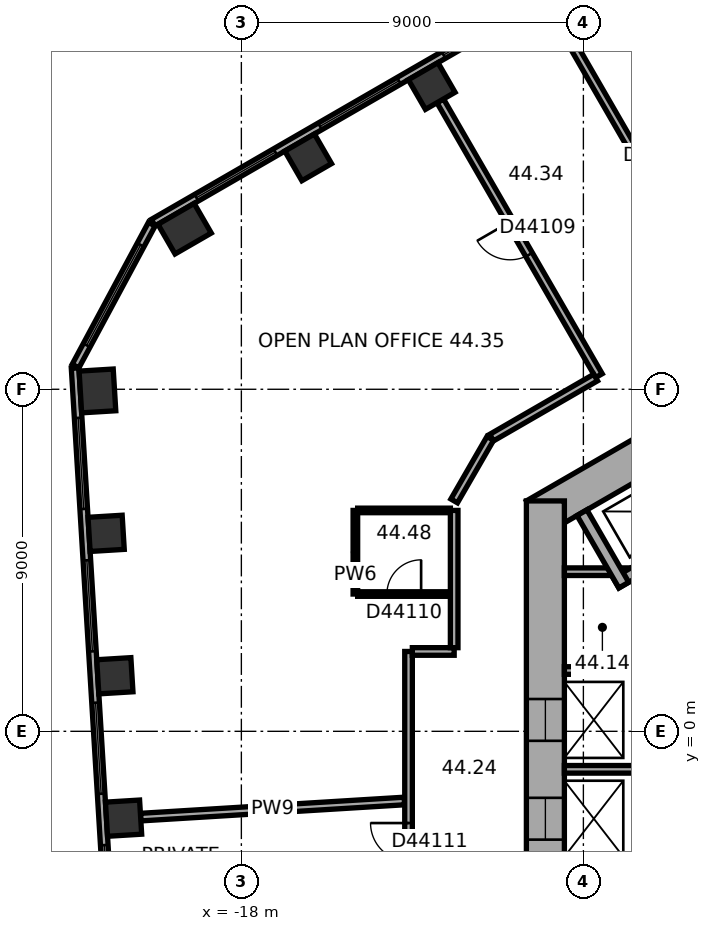
"""IFC4 building model, lengths in metres.
Left out: names, types, materials, properties, quantities, classifications, styles, units other than length and angle.
Written with IfcOpenShell. Run it as: python <this file> out.ifc"""

import sys

from ifc_helpers import new_model, si_unit, direction, frame, frame_2d, origin, origin_2d, place, context, subcontext, project, spatial, rectangle, extrude, element, fill, save


model = new_model("IFC4")
c1 = context("Model", 3, precision=1e-05, world=origin(), true_north=direction((0.0, 1.0)))
c2 = subcontext(c1, "Body", "Model", "MODEL_VIEW")
j1 = project(units=[si_unit("LENGTHUNIT", "METRE"), si_unit("PLANEANGLEUNIT", "RADIAN")], contexts=[c1])
p1 = place(None, origin())
s1 = spatial("IfcSite", under=j1, at=p1, CompositionType="ELEMENT")
p2 = place(p1, origin())
s2 = spatial("IfcBuilding", under=s1, at=p2, CompositionType="ELEMENT")
p3 = place(p2, frame((0.0, 0.0, 179.9)))
s3 = spatial("IfcBuildingStorey", under=s2, at=p3, CompositionType="ELEMENT", Elevation=179.9)
for number, where, z_axis, x_axis in (
    (1, (-12.991, 16.979, 0.0), (0.0, 0.0, 1.0), (-0.866, -0.5, 0.0)),
    (2, (-16.242, 15.102, 0.0), (0.0, 0.0, 1.0), (-0.866, -0.5, 0.0)),
):
    element("IfcColumn", number, at=place(p3, frame(where, z_axis=z_axis, x_axis=x_axis)), inside=s3, PredefinedType="COLUMN", context=c2, shape_type="SweptSolid", body=[
        extrude(rectangle(XDim=0.9, YDim=0.9, at=origin_2d()), origin(), (0.0, 0.0, 1.0), 3.7),
    ])
for number, where, z_axis, x_axis in (
    (3, (-19.494, 13.225, 0.0), (0.0, 0.0, 1.0), (-0.866, -0.5, 0.0)),
    (4, (-21.787, 8.956, 0.0), (0.0, 0.0, 1.0), (0.061, -0.998, 0.0)),
):
    element("IfcColumn", number, at=place(p3, frame(where, z_axis=z_axis, x_axis=x_axis)), inside=s3, PredefinedType="COLUMN", context=c2, shape_type="SweptSolid", body=[
        extrude(rectangle(XDim=1.1, YDim=0.9, at=origin_2d()), origin(), (0.0, 0.0, 1.0), 3.7),
    ])
for number, where, z_axis, x_axis in (
    (5, (-21.558, 5.209, 0.0), (0.0, 0.0, 1.0), (0.061, -0.998, 0.0)),
    (6, (-21.329, 1.462, 0.0), (0.0, 0.0, 1.0), (0.061, -0.998, 0.0)),
    (7, (-21.1, -2.285, 0.0), (0.0, 0.0, 1.0), (0.061, -0.998, 0.0)),
):
    element("IfcColumn", number, at=place(p3, frame(where, z_axis=z_axis, x_axis=x_axis)), inside=s3, PredefinedType="COLUMN", context=c2, shape_type="SweptSolid", body=[
        extrude(rectangle(XDim=0.9, YDim=0.9, at=origin_2d()), origin(), (0.0, 0.0, 1.0), 3.7),
    ])
p4 = place(p3, frame((0.25, 11.691, 0.0), z_axis=(0.0, 0.0, 1.0), x_axis=(-0.866022616891, -0.50000482701, 0.0)))
e8 = element("IfcWall", 8, at=p4, inside=s3, PredefinedType="SHEAR", context=c2, shape_type="SweptSolid", body=[
    extrude(rectangle(XDim=12.125, YDim=1.0, at=frame_2d((6.062, 0.0))), origin(), (0.0, 0.0, 1.0), 3.7),
])
p5 = place(p4, frame((6.262, 0.0, 0.0)))
e9 = element("IfcOpeningElement", 9, at=p5, cuts=e8, PredefinedType="OPENING", context=c2, shape_type="SweptSolid", body=[
    extrude(rectangle(XDim=1.5, YDim=2.1, at=frame_2d((0.75, 1.05))), frame((0.0, 0.51, 0.0), z_axis=(0.0, -1.0, 0.0), x_axis=(1.0, 0.0, 0.0)), (0.0, 0.0, 1.0), 1.02),
])
p6 = place(p4, frame((1.812, 0.0, 0.0)))
e10 = element("IfcOpeningElement", 10, at=p6, cuts=e8, PredefinedType="OPENING", context=c2, shape_type="SweptSolid", body=[
    extrude(rectangle(XDim=0.9, YDim=2.1, at=frame_2d((0.45, 1.05))), frame((0.0, 0.51, 0.0), z_axis=(0.0, -1.0, 0.0), x_axis=(1.0, 0.0, 0.0)), (0.0, 0.0, 1.0), 1.02),
])
p7 = place(p4, frame((4.412, 0.0, 0.0)))
e11 = element("IfcOpeningElement", 11, at=p7, cuts=e8, PredefinedType="OPENING", context=c2, shape_type="SweptSolid", body=[
    extrude(rectangle(XDim=0.9, YDim=2.1, at=frame_2d((0.45, 1.05))), frame((0.0, 0.51, 0.0), z_axis=(0.0, -1.0, 0.0), x_axis=(1.0, 0.0, 0.0)), (0.0, 0.0, 1.0), 1.02),
])
p8 = place(p3, frame((-10.0, 6.062, 0.0), z_axis=(0.0, 0.0, 1.0), x_axis=(0.0, -1.0, 0.0)))
e12 = element("IfcWall", 12, at=p8, inside=s3, PredefinedType="SHEAR", context=c2, shape_type="SweptSolid", body=[
    extrude(rectangle(XDim=12.125, YDim=1.0, at=frame_2d((6.062, 0.0))), origin(), (0.0, 0.0, 1.0), 3.7),
])
p9 = place(p8, frame((5.212, 0.0, 0.0)))
e13 = element("IfcOpeningElement", 13, at=p9, cuts=e12, PredefinedType="OPENING", context=c2, shape_type="SweptSolid", body=[
    extrude(rectangle(XDim=1.1, YDim=2.1, at=frame_2d((0.55, 1.05))), frame((0.0, 0.51, 0.0), z_axis=(0.0, -1.0, 0.0), x_axis=(1.0, 0.0, 0.0)), (0.0, 0.0, 1.0), 1.02),
])
p10 = place(p8, frame((7.812, 0.0, 0.0)))
e14 = element("IfcOpeningElement", 14, at=p10, cuts=e12, PredefinedType="OPENING", context=c2, shape_type="SweptSolid", body=[
    extrude(rectangle(XDim=1.1, YDim=2.1, at=frame_2d((0.55, 1.05))), frame((0.0, 0.51, 0.0), z_axis=(0.0, -1.0, 0.0), x_axis=(1.0, 0.0, 0.0)), (0.0, 0.0, 1.0), 1.02),
])
p11 = place(p3, frame((-2.961, 23.405, 0.0), z_axis=(0.0, 0.0, 1.0), x_axis=(-0.866023315909, -0.500003616288, 0.0)))
e15 = element("IfcWall", 15, at=p11, inside=s3, PredefinedType="STANDARD", context=c2, shape_type="SweptSolid", body=[
    extrude(rectangle(XDim=20.044, YDim=0.2, at=frame_2d((10.022, 0.0))), origin(), (0.0, 0.0, 1.0), 3.7),
])
p12 = place(p11, frame((1.314, 0.0, 0.9)))
e16 = element("IfcOpeningElement", 16, at=p12, cuts=e15, PredefinedType="OPENING", context=c2, shape_type="SweptSolid", body=[
    extrude(rectangle(XDim=2.4, YDim=2.0, at=frame_2d((1.2, 1.0))), frame((0.0, 0.11, 0.0), z_axis=(0.0, -1.0, 0.0), x_axis=(1.0, 0.0, 0.0)), (0.0, 0.0, 1.0), 0.22),
])
p13 = place(p11, frame((5.069, 0.0, 0.9)))
e17 = element("IfcOpeningElement", 17, at=p13, cuts=e15, PredefinedType="OPENING", context=c2, shape_type="SweptSolid", body=[
    extrude(rectangle(XDim=2.4, YDim=2.0, at=frame_2d((1.2, 1.0))), frame((0.0, 0.11, 0.0), z_axis=(0.0, -1.0, 0.0), x_axis=(1.0, 0.0, 0.0)), (0.0, 0.0, 1.0), 0.22),
])
p14 = place(p11, frame((8.823, 0.0, 0.9)))
e18 = element("IfcOpeningElement", 18, at=p14, cuts=e15, PredefinedType="OPENING", context=c2, shape_type="SweptSolid", body=[
    extrude(rectangle(XDim=2.4, YDim=2.0, at=frame_2d((1.2, 1.0))), frame((0.0, 0.11, 0.0), z_axis=(0.0, -1.0, 0.0), x_axis=(1.0, 0.0, 0.0)), (0.0, 0.0, 1.0), 0.22),
])
p15 = place(p11, frame((12.577, 0.0, 0.9)))
e19 = element("IfcOpeningElement", 19, at=p15, cuts=e15, PredefinedType="OPENING", context=c2, shape_type="SweptSolid", body=[
    extrude(rectangle(XDim=2.4, YDim=2.0, at=frame_2d((1.2, 1.0))), frame((0.0, 0.11, 0.0), z_axis=(0.0, -1.0, 0.0), x_axis=(1.0, 0.0, 0.0)), (0.0, 0.0, 1.0), 0.22),
])
p16 = place(p11, frame((16.331, 0.0, 0.9)))
e20 = element("IfcOpeningElement", 20, at=p16, cuts=e15, PredefinedType="OPENING", context=c2, shape_type="SweptSolid", body=[
    extrude(rectangle(XDim=2.4, YDim=2.0, at=frame_2d((1.2, 1.0))), frame((0.0, 0.11, 0.0), z_axis=(0.0, -1.0, 0.0), x_axis=(1.0, 0.0, 0.0)), (0.0, 0.0, 1.0), 0.22),
])
p17 = place(p3, frame((-20.357, 13.344, 0.0), z_axis=(0.0, 0.0, 1.0), x_axis=(-0.473288913494, -0.880907262068, 0.0)))
e21 = element("IfcWall", 21, at=p17, inside=s3, PredefinedType="STANDARD", context=c2, shape_type="SweptSolid", body=[
    extrude(rectangle(XDim=4.238, YDim=0.2, at=frame_2d((2.119, 0.0))), origin(), (0.0, 0.0, 1.0), 3.7),
])
p18 = place(p17, frame((0.619, 0.0, 0.9)))
e22 = element("IfcOpeningElement", 22, at=p18, cuts=e21, PredefinedType="OPENING", context=c2, shape_type="SweptSolid", body=[
    extrude(rectangle(XDim=3.0, YDim=2.0, at=frame_2d((1.5, 1.0))), frame((0.0, 0.11, 0.0), z_axis=(0.0, -1.0, 0.0), x_axis=(1.0, 0.0, 0.0)), (0.0, 0.0, 1.0), 0.22),
])
p19 = place(p3, frame((-22.375, 9.557, 0.0), z_axis=(0.0, 0.0, 1.0), x_axis=(0.061036015339, -0.998135564356, 0.0)))
e23 = element("IfcWall", 23, at=p19, inside=s3, PredefinedType="STANDARD", context=c2, shape_type="SweptSolid", body=[
    extrude(rectangle(XDim=20.044, YDim=0.2, at=frame_2d((10.022, 0.0))), origin(), (0.0, 0.0, 1.0), 3.7),
])
p20 = place(p19, frame((1.313, 0.0, 0.9)))
e24 = element("IfcOpeningElement", 24, at=p20, cuts=e23, PredefinedType="OPENING", context=c2, shape_type="SweptSolid", body=[
    extrude(rectangle(XDim=2.4, YDim=2.0, at=frame_2d((1.2, 1.0))), frame((0.0, 0.11, 0.0), z_axis=(0.0, -1.0, 0.0), x_axis=(1.0, 0.0, 0.0)), (0.0, 0.0, 1.0), 0.22),
])
p21 = place(p19, frame((5.067, 0.0, 0.9)))
e25 = element("IfcOpeningElement", 25, at=p21, cuts=e23, PredefinedType="OPENING", context=c2, shape_type="SweptSolid", body=[
    extrude(rectangle(XDim=2.4, YDim=2.0, at=frame_2d((1.2, 1.0))), frame((0.0, 0.11, 0.0), z_axis=(0.0, -1.0, 0.0), x_axis=(1.0, 0.0, 0.0)), (0.0, 0.0, 1.0), 0.22),
])
p22 = place(p19, frame((8.821, 0.0, 0.9)))
e26 = element("IfcOpeningElement", 26, at=p22, cuts=e23, PredefinedType="OPENING", context=c2, shape_type="SweptSolid", body=[
    extrude(rectangle(XDim=2.4, YDim=2.0, at=frame_2d((1.2, 1.0))), frame((0.0, 0.11, 0.0), z_axis=(0.0, -1.0, 0.0), x_axis=(1.0, 0.0, 0.0)), (0.0, 0.0, 1.0), 0.22),
])
p23 = place(p19, frame((12.575, 0.0, 0.9)))
e27 = element("IfcOpeningElement", 27, at=p23, cuts=e23, PredefinedType="OPENING", context=c2, shape_type="SweptSolid", body=[
    extrude(rectangle(XDim=2.4, YDim=2.0, at=frame_2d((1.2, 1.0))), frame((0.0, 0.11, 0.0), z_axis=(0.0, -1.0, 0.0), x_axis=(1.0, 0.0, 0.0)), (0.0, 0.0, 1.0), 0.22),
])
p24 = place(p19, frame((16.329, 0.0, 0.9)))
e28 = element("IfcOpeningElement", 28, at=p24, cuts=e23, PredefinedType="OPENING", context=c2, shape_type="SweptSolid", body=[
    extrude(rectangle(XDim=2.4, YDim=2.0, at=frame_2d((1.2, 1.0))), frame((0.0, 0.11, 0.0), z_axis=(0.0, -1.0, 0.0), x_axis=(1.0, 0.0, 0.0)), (0.0, 0.0, 1.0), 0.22),
])
for number, where, z_axis, x_axis in (
    (29, (-7.3, 4.2, 0.0), (0.0, 0.0, 1.0), (-1.0, 0.0, 0.0)),
    (30, (-7.3, 1.6, 0.0), (0.0, 0.0, 1.0), (-1.0, 0.0, 0.0)),
    (31, (-7.3, -1.0, 0.0), (0.0, 0.0, 1.0), (-1.0, 0.0, 0.0)),
):
    element("IfcWall", number, at=place(p3, frame(where, z_axis=z_axis, x_axis=x_axis)), inside=s3, PredefinedType="PARTITIONING", context=c2, shape_type="SweptSolid", body=[
        extrude(rectangle(XDim=2.2, YDim=0.2, at=frame_2d((1.1, 0.0))), origin(), (0.0, 0.0, 1.0), 3.42),
    ])
p25 = place(p3, frame((-5.24, 5.577, 0.0), z_axis=(0.0, 0.0, 1.0), x_axis=(-0.866014461049, -0.500018952895, 0.0)))
e32 = element("IfcWall", 32, at=p25, inside=s3, PredefinedType="SHEAR", context=c2, shape_type="SweptSolid", body=[
    extrude(rectangle(XDim=3.35, YDim=0.3, at=frame_2d((1.675, 0.0))), origin(), (0.0, 0.0, 1.0), 3.42),
])
p26 = place(p3, frame((-7.937, 3.847, 0.0), z_axis=(0.0, 0.0, 1.0), x_axis=(-0.50002983664, 0.866008176907, 0.0)))
e33 = element("IfcWall", 33, at=p26, inside=s3, PredefinedType="SHEAR", context=c2, shape_type="SweptSolid", body=[
    extrude(rectangle(XDim=2.2, YDim=0.3, at=frame_2d((1.1, 0.0))), origin(), (0.0, 0.0, 1.0), 3.42),
])
p27 = place(p3, frame((-20.651, -2.258, 0.0), z_axis=(0.0, 0.0, 1.0), x_axis=(0.998133960965, 0.061062230286, 0.0)))
e34 = element("IfcWall", 34, at=p27, inside=s3, PredefinedType="PARTITIONING", context=c2, shape_type="SweptSolid", body=[
    extrude(rectangle(XDim=6.953, YDim=0.2, at=frame_2d((3.477, 0.0))), origin(), (0.0, 0.0, 1.0), 3.42),
])
p28 = place(p3, frame((-15.0, 3.612, 0.0), z_axis=(0.0, 0.0, 1.0), x_axis=(0.0, 1.0, 0.0)))
e35 = element("IfcWall", 35, at=p28, inside=s3, PredefinedType="PARTITIONING", context=c2, shape_type="SweptSolid", body=[
    extrude(rectangle(XDim=2.2, YDim=0.12, at=frame_2d((1.1, 0.0))), origin(), (0.0, 0.0, 1.0), 3.42),
])
p29 = place(p3, frame((-14.94, 5.812, 0.0), z_axis=(0.0, 0.0, 1.0), x_axis=(1.0, 0.0, 0.0)))
e36 = element("IfcWall", 36, at=p29, inside=s3, PredefinedType="PARTITIONING", context=c2, shape_type="SweptSolid", body=[
    extrude(rectangle(XDim=2.44, YDim=0.12, at=frame_2d((1.22, 0.0))), origin(), (0.0, 0.0, 1.0), 3.42),
])
p30 = place(p3, frame((-13.601, 2.101, 0.0), z_axis=(0.0, 0.0, 1.0), x_axis=(0.0, -1.0, 0.0)))
e37 = element("IfcWall", 37, at=p30, inside=s3, PredefinedType="PARTITIONING", context=c2, shape_type="SweptSolid", body=[
    extrude(rectangle(XDim=6.102, YDim=0.2, at=frame_2d((3.051, 0.0))), origin(), (0.0, 0.0, 1.0), 3.42),
])
p31 = place(p30, frame((4.515, 0.0, 0.0)))
e38 = element("IfcOpeningElement", 38, at=p31, cuts=e37, PredefinedType="OPENING", context=c2, shape_type="SweptSolid", body=[
    extrude(rectangle(XDim=1.0, YDim=2.1, at=frame_2d((0.5, 1.05))), frame((0.0, 0.11, 0.0), z_axis=(0.0, -1.0, 0.0), x_axis=(1.0, 0.0, 0.0)), (0.0, 0.0, 1.0), 0.22),
])
p32 = place(p3, frame((-12.766, 16.589, 0.0), z_axis=(0.0, 0.0, 1.0), x_axis=(0.500010139422, -0.866019549707, 0.0)))
e39 = element("IfcWall", 39, at=p32, inside=s3, PredefinedType="PARTITIONING", context=c2, shape_type="SweptSolid", body=[
    extrude(rectangle(XDim=8.35, YDim=0.2, at=frame_2d((4.175, 0.0))), origin(), (0.0, 0.0, 1.0), 3.42),
])
p33 = place(p32, frame((3.675, 0.0, 0.0)))
e40 = element("IfcOpeningElement", 40, at=p33, cuts=e39, PredefinedType="OPENING", context=c2, shape_type="SweptSolid", body=[
    extrude(rectangle(XDim=1.0, YDim=2.1, at=frame_2d((0.5, 1.05))), frame((0.0, 0.11, 0.0), z_axis=(0.0, -1.0, 0.0), x_axis=(1.0, 0.0, 0.0)), (0.0, 0.0, 1.0), 0.22),
])
p34 = place(p3, frame((-12.5, 3.612, 0.0), z_axis=(0.0, 0.0, 1.0), x_axis=(-1.0, 0.0, 0.0)))
e41 = element("IfcWall", 41, at=p34, inside=s3, PredefinedType="PARTITIONING", context=c2, shape_type="SweptSolid", body=[
    extrude(rectangle(XDim=2.44, YDim=0.12, at=frame_2d((1.22, 0.0))), origin(), (0.0, 0.0, 1.0), 3.42),
])
p35 = place(p34, frame((0.77, 0.0, 0.0)))
e42 = element("IfcOpeningElement", 42, at=p35, cuts=e41, PredefinedType="OPENING", context=c2, shape_type="SweptSolid", body=[
    extrude(rectangle(XDim=0.9, YDim=2.1, at=frame_2d((0.45, 1.05))), frame((0.0, 0.07, 0.0), z_axis=(0.0, -1.0, 0.0), x_axis=(1.0, 0.0, 0.0)), (0.0, 0.0, 1.0), 0.14),
])
p36 = place(p3, frame((-12.4, 2.101, 0.0), z_axis=(0.0, 0.0, 1.0), x_axis=(-1.0, 0.0, 0.0)))
e43 = element("IfcWall", 43, at=p36, inside=s3, PredefinedType="PARTITIONING", context=c2, shape_type="SweptSolid", body=[
    extrude(rectangle(XDim=1.101, YDim=0.2, at=frame_2d((0.551, 0.0))), origin(), (0.0, 0.0, 1.0), 3.42),
])
p37 = place(p3, frame((-12.4, 5.812, 0.0), z_axis=(0.0, 0.0, 1.0), x_axis=(0.0, -1.0, 0.0)))
e44 = element("IfcWall", 44, at=p37, inside=s3, PredefinedType="PARTITIONING", context=c2, shape_type="SweptSolid", body=[
    extrude(rectangle(XDim=3.611, YDim=0.2, at=frame_2d((1.806, 0.0))), origin(), (0.0, 0.0, 1.0), 3.42),
])
p38 = place(p3, frame((-11.45, 7.708, 0.0), z_axis=(0.0, 0.0, 1.0), x_axis=(-0.500022797313, -0.86601224135, 0.0)))
e45 = element("IfcWall", 45, at=p38, inside=s3, PredefinedType="PARTITIONING", context=c2, shape_type="SweptSolid", body=[
    extrude(rectangle(XDim=1.9, YDim=0.2, at=frame_2d((0.95, 0.0))), origin(), (0.0, 0.0, 1.0), 3.42),
])
p39 = place(p3, frame((-9.515, 18.466, 0.0), z_axis=(0.0, 0.0, 1.0), x_axis=(0.500010139422, -0.866019549707, 0.0)))
e46 = element("IfcWall", 46, at=p39, inside=s3, PredefinedType="PARTITIONING", context=c2, shape_type="SweptSolid", body=[
    extrude(rectangle(XDim=8.35, YDim=0.2, at=frame_2d((4.175, 0.0))), origin(), (0.0, 0.0, 1.0), 2.87),
])
p40 = place(p39, frame((3.675, 0.0, 0.0)))
e47 = element("IfcOpeningElement", 47, at=p40, cuts=e46, PredefinedType="OPENING", context=c2, shape_type="SweptSolid", body=[
    extrude(rectangle(XDim=1.0, YDim=2.1, at=frame_2d((0.5, 1.05))), frame((0.0, 0.11, 0.0), z_axis=(0.0, -1.0, 0.0), x_axis=(1.0, 0.0, 0.0)), (0.0, 0.0, 1.0), 0.22),
])
p41 = place(p3, frame((-8.678, 9.308, 0.0), z_axis=(0.0, 0.0, 1.0), x_axis=(-0.866000359435, -0.500043375578, 0.0)))
e48 = element("IfcWall", 48, at=p41, inside=s3, PredefinedType="PARTITIONING", context=c2, shape_type="SweptSolid", body=[
    extrude(rectangle(XDim=3.161, YDim=0.2, at=frame_2d((1.581, 0.0))), origin(), (0.0, 0.0, 1.0), 3.42),
])
p42 = place(p14, origin())
e49 = element("IfcWindow", 49, at=p42, inside=s3, PartitioningType="SINGLE_PANEL", PredefinedType="WINDOW", context=c2, shape_type="SweptSolid", body=[
    extrude(rectangle(XDim=2.4, YDim=2.0, at=frame_2d((1.2, 1.0))), frame((0.0, 0.03, 0.0), z_axis=(0.0, -1.0, 0.0), x_axis=(1.0, 0.0, 0.0)), (0.0, 0.0, 1.0), 0.06),
])
fill(e18, e49)
p43 = place(p15, origin())
e50 = element("IfcWindow", 50, at=p43, inside=s3, PartitioningType="SINGLE_PANEL", PredefinedType="WINDOW", context=c2, shape_type="SweptSolid", body=[
    extrude(rectangle(XDim=2.4, YDim=2.0, at=frame_2d((1.2, 1.0))), frame((0.0, 0.03, 0.0), z_axis=(0.0, -1.0, 0.0), x_axis=(1.0, 0.0, 0.0)), (0.0, 0.0, 1.0), 0.06),
])
fill(e19, e50)
p44 = place(p16, origin())
e51 = element("IfcWindow", 51, at=p44, inside=s3, PartitioningType="SINGLE_PANEL", PredefinedType="WINDOW", context=c2, shape_type="SweptSolid", body=[
    extrude(rectangle(XDim=2.4, YDim=2.0, at=frame_2d((1.2, 1.0))), frame((0.0, 0.03, 0.0), z_axis=(0.0, -1.0, 0.0), x_axis=(1.0, 0.0, 0.0)), (0.0, 0.0, 1.0), 0.06),
])
fill(e20, e51)
p45 = place(p18, origin())
e52 = element("IfcWindow", 52, at=p45, inside=s3, PartitioningType="SINGLE_PANEL", PredefinedType="WINDOW", context=c2, shape_type="SweptSolid", body=[
    extrude(rectangle(XDim=3.0, YDim=2.0, at=frame_2d((1.5, 1.0))), frame((0.0, 0.03, 0.0), z_axis=(0.0, -1.0, 0.0), x_axis=(1.0, 0.0, 0.0)), (0.0, 0.0, 1.0), 0.06),
])
fill(e22, e52)
p46 = place(p20, origin())
e53 = element("IfcWindow", 53, at=p46, inside=s3, PartitioningType="SINGLE_PANEL", PredefinedType="WINDOW", context=c2, shape_type="SweptSolid", body=[
    extrude(rectangle(XDim=2.4, YDim=2.0, at=frame_2d((1.2, 1.0))), frame((0.0, 0.03, 0.0), z_axis=(0.0, -1.0, 0.0), x_axis=(1.0, 0.0, 0.0)), (0.0, 0.0, 1.0), 0.06),
])
fill(e24, e53)
p47 = place(p21, origin())
e54 = element("IfcWindow", 54, at=p47, inside=s3, PartitioningType="SINGLE_PANEL", PredefinedType="WINDOW", context=c2, shape_type="SweptSolid", body=[
    extrude(rectangle(XDim=2.4, YDim=2.0, at=frame_2d((1.2, 1.0))), frame((0.0, 0.03, 0.0), z_axis=(0.0, -1.0, 0.0), x_axis=(1.0, 0.0, 0.0)), (0.0, 0.0, 1.0), 0.06),
])
fill(e25, e54)
p48 = place(p22, origin())
e55 = element("IfcWindow", 55, at=p48, inside=s3, PartitioningType="SINGLE_PANEL", PredefinedType="WINDOW", context=c2, shape_type="SweptSolid", body=[
    extrude(rectangle(XDim=2.4, YDim=2.0, at=frame_2d((1.2, 1.0))), frame((0.0, 0.03, 0.0), z_axis=(0.0, -1.0, 0.0), x_axis=(1.0, 0.0, 0.0)), (0.0, 0.0, 1.0), 0.06),
])
fill(e26, e55)
p49 = place(p23, origin())
e56 = element("IfcWindow", 56, at=p49, inside=s3, PartitioningType="SINGLE_PANEL", PredefinedType="WINDOW", context=c2, shape_type="SweptSolid", body=[
    extrude(rectangle(XDim=2.4, YDim=2.0, at=frame_2d((1.2, 1.0))), frame((0.0, 0.03, 0.0), z_axis=(0.0, -1.0, 0.0), x_axis=(1.0, 0.0, 0.0)), (0.0, 0.0, 1.0), 0.06),
])
fill(e27, e56)
p50 = place(p9, origin())
e57 = element("IfcDoor", 57, at=p50, inside=s3, OperationType="DOUBLE_DOOR_SLIDING", PredefinedType="DOOR", context=c2, shape_type="SweptSolid", body=[
    extrude(rectangle(XDim=1.1, YDim=2.1, at=frame_2d((0.55, 1.05))), frame((0.0, 0.025, 0.0), z_axis=(0.0, -1.0, 0.0), x_axis=(1.0, 0.0, 0.0)), (0.0, 0.0, 1.0), 0.05),
])
fill(e13, e57)
p51 = place(p10, origin())
e58 = element("IfcDoor", 58, at=p51, inside=s3, OperationType="DOUBLE_DOOR_SLIDING", PredefinedType="DOOR", context=c2, shape_type="SweptSolid", body=[
    extrude(rectangle(XDim=1.1, YDim=2.1, at=frame_2d((0.55, 1.05))), frame((0.0, 0.025, 0.0), z_axis=(0.0, -1.0, 0.0), x_axis=(1.0, 0.0, 0.0)), (0.0, 0.0, 1.0), 0.05),
])
fill(e14, e58)
p52 = place(p33, origin())
e59 = element("IfcDoor", 59, at=p52, inside=s3, OperationType="SINGLE_SWING_LEFT", PredefinedType="DOOR", context=c2, shape_type="SweptSolid", body=[
    extrude(rectangle(XDim=1.0, YDim=2.1, at=frame_2d((0.5, 1.05))), frame((0.0, 0.025, 0.0), z_axis=(0.0, -1.0, 0.0), x_axis=(1.0, 0.0, 0.0)), (0.0, 0.0, 1.0), 0.05),
])
fill(e40, e59)
p53 = place(p35, origin())
e60 = element("IfcDoor", 60, at=p53, inside=s3, OperationType="SINGLE_SWING_LEFT", PredefinedType="DOOR", context=c2, shape_type="SweptSolid", body=[
    extrude(rectangle(XDim=0.9, YDim=2.1, at=frame_2d((0.45, 1.05))), frame((0.0, 0.025, 0.0), z_axis=(0.0, -1.0, 0.0), x_axis=(1.0, 0.0, 0.0)), (0.0, 0.0, 1.0), 0.05),
])
fill(e42, e60)
p54 = place(p31, origin())
e61 = element("IfcDoor", 61, at=p54, inside=s3, OperationType="SINGLE_SWING_LEFT", PredefinedType="DOOR", context=c2, shape_type="SweptSolid", body=[
    extrude(rectangle(XDim=1.0, YDim=2.1, at=frame_2d((0.5, 1.05))), frame((0.0, 0.025, 0.0), z_axis=(0.0, -1.0, 0.0), x_axis=(1.0, 0.0, 0.0)), (0.0, 0.0, 1.0), 0.05),
])
fill(e38, e61)
save(model, sys.argv[1])
